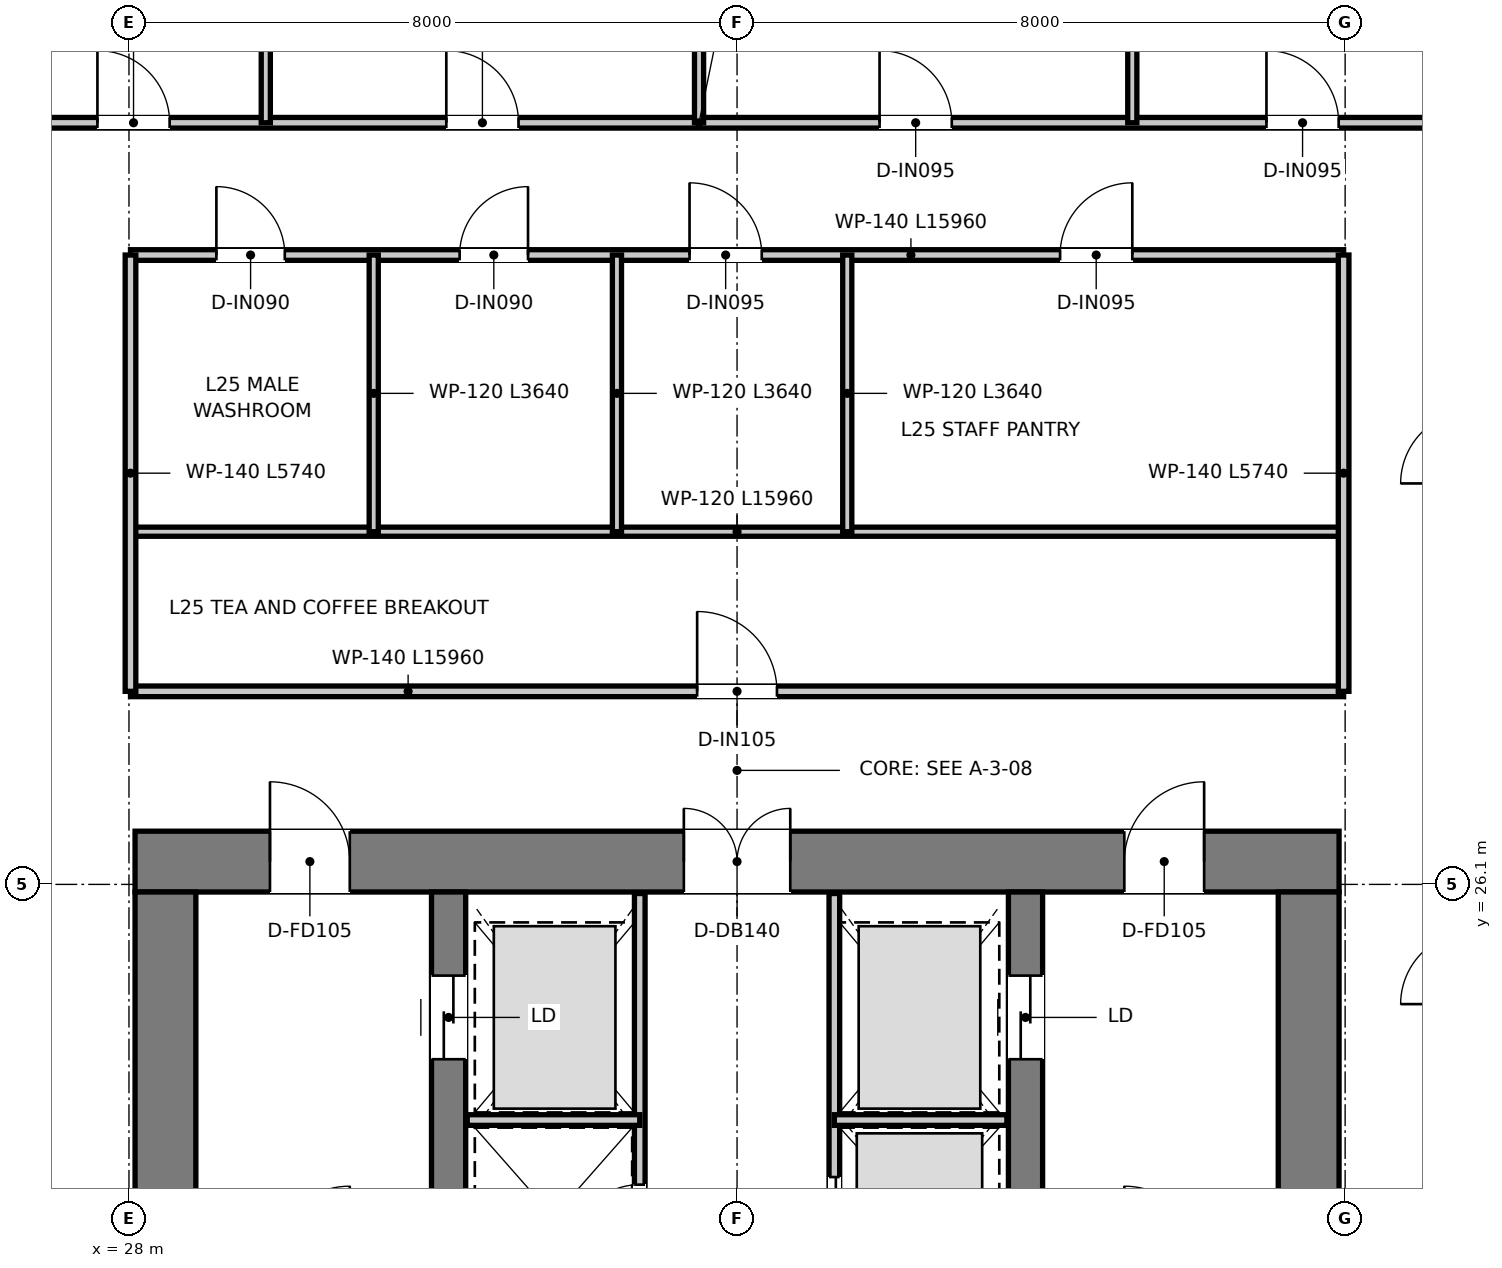
"""IFC4 building model, lengths in metres.
Left out: names, types, materials, properties, quantities, classifications, styles, units other than length and angle.
Written with IfcOpenShell. Run it as: python <this file> out.ifc"""

import sys

from ifc_helpers import new_model, si_unit, direction, frame, frame_2d, origin, place, context, subcontext, project, spatial, rectangle, extrude, element, fill, save


model = new_model("IFC4")
c1 = context("Model", 3, precision=1e-05, world=origin(), true_north=direction((0.0, 1.0)))
c2 = subcontext(c1, "Body", "Model", "MODEL_VIEW")
j1 = project(units=[si_unit("LENGTHUNIT", "METRE"), si_unit("PLANEANGLEUNIT", "RADIAN")], contexts=[c1])
p1 = place(None, origin())
s1 = spatial("IfcSite", under=j1, at=p1, CompositionType="ELEMENT")
p2 = place(p1, origin())
s2 = spatial("IfcBuilding", under=s1, at=p2, CompositionType="ELEMENT")
p3 = place(p2, frame((0.0, 0.0, 105.85)))
s3 = spatial("IfcBuildingStorey", under=s2, at=p3, CompositionType="ELEMENT", Elevation=105.85)
p4 = place(p3, frame((28.08, 26.4, 0.0), z_axis=(0.0, 0.0, 1.0), x_axis=(1.0, 0.0, 0.0)))
e1 = element("IfcWall", 1, at=p4, inside=s3, PredefinedType="SHEAR", context=c2, shape_type="SweptSolid", body=[
    extrude(rectangle(XDim=15.84, YDim=0.8, at=frame_2d((7.92, 0.0))), origin(), (0.0, 0.0, 1.0), 3.95),
])
p5 = place(p4, frame((7.22, 0.0, 0.0)))
e2 = element("IfcOpeningElement", 2, at=p5, cuts=e1, PredefinedType="OPENING", context=c2, shape_type="SweptSolid", body=[
    extrude(rectangle(XDim=1.4, YDim=2.2, at=frame_2d((0.7, 1.1))), frame((0.0, 0.41, 0.0), z_axis=(0.0, -1.0, 0.0), x_axis=(1.0, 0.0, 0.0)), (0.0, 0.0, 1.0), 0.82),
])
p6 = place(p4, frame((1.775, 0.0, 0.0)))
e3 = element("IfcOpeningElement", 3, at=p6, cuts=e1, PredefinedType="OPENING", context=c2, shape_type="SweptSolid", body=[
    extrude(rectangle(XDim=1.05, YDim=2.1, at=frame_2d((0.525, 1.05))), frame((0.0, 0.41, 0.0), z_axis=(0.0, -1.0, 0.0), x_axis=(1.0, 0.0, 0.0)), (0.0, 0.0, 1.0), 0.82),
])
p7 = place(p4, frame((13.015, 0.0, 0.0)))
e4 = element("IfcOpeningElement", 4, at=p7, cuts=e1, PredefinedType="OPENING", context=c2, shape_type="SweptSolid", body=[
    extrude(rectangle(XDim=1.05, YDim=2.1, at=frame_2d((0.525, 1.05))), frame((0.0, 0.41, 0.0), z_axis=(0.0, -1.0, 0.0), x_axis=(1.0, 0.0, 0.0)), (0.0, 0.0, 1.0), 0.82),
])
for number, where, z_axis, x_axis in (
    (5, (28.48, 11.3, 0.0), (0.0, 0.0, 1.0), (0.0, 1.0, 0.0)),
    (6, (43.52, 11.3, 0.0), (0.0, 0.0, 1.0), (0.0, 1.0, 0.0)),
):
    element("IfcWall", number, at=place(p3, frame(where, z_axis=z_axis, x_axis=x_axis)), inside=s3, PredefinedType="SHEAR", context=c2, shape_type="SweptSolid", body=[
        extrude(rectangle(XDim=14.7, YDim=0.8, at=frame_2d((7.35, 0.0))), origin(), (0.0, 0.0, 1.0), 3.95),
    ])
p8 = place(p3, frame((32.205, 13.22, 0.0), z_axis=(0.0, 0.0, 1.0), x_axis=(0.0, 1.0, 0.0)))
e7 = element("IfcWall", 7, at=p8, inside=s3, PredefinedType="SHEAR", context=c2, shape_type="SweptSolid", body=[
    extrude(rectangle(XDim=12.78, YDim=0.45, at=frame_2d((6.39, 0.0))), origin(), (0.0, 0.0, 1.0), 3.95),
])
p9 = place(p8, frame((10.58, 0.0, 0.0)))
e8 = element("IfcOpeningElement", 8, at=p9, cuts=e7, PredefinedType="OPENING", context=c2, shape_type="SweptSolid", body=[
    extrude(rectangle(XDim=1.1, YDim=2.15, at=frame_2d((0.55, 1.075))), frame((0.0, 0.235, 0.0), z_axis=(0.0, -1.0, 0.0), x_axis=(1.0, 0.0, 0.0)), (0.0, 0.0, 1.0), 0.47),
])
p10 = place(p3, frame((39.795, 13.22, 0.0), z_axis=(0.0, 0.0, 1.0), x_axis=(0.0, 1.0, 0.0)))
e9 = element("IfcWall", 9, at=p10, inside=s3, PredefinedType="SHEAR", context=c2, shape_type="SweptSolid", body=[
    extrude(rectangle(XDim=12.78, YDim=0.45, at=frame_2d((6.39, 0.0))), origin(), (0.0, 0.0, 1.0), 3.95),
])
p11 = place(p10, frame((10.58, 0.0, 0.0)))
e10 = element("IfcOpeningElement", 10, at=p11, cuts=e9, PredefinedType="OPENING", context=c2, shape_type="SweptSolid", body=[
    extrude(rectangle(XDim=1.1, YDim=2.15, at=frame_2d((0.55, 1.075))), frame((0.0, 0.235, 0.0), z_axis=(0.0, -1.0, 0.0), x_axis=(1.0, 0.0, 0.0)), (0.0, 0.0, 1.0), 0.47),
])
p12 = place(p3, frame((34.72, 20.2, 0.0), z_axis=(0.0, 0.0, 1.0), x_axis=(0.0, 1.0, 0.0)))
e11 = element("IfcWall", 11, at=p12, inside=s3, PredefinedType="PARTITIONING", context=c2, shape_type="SweptSolid", body=[
    extrude(rectangle(XDim=5.78, YDim=0.14, at=frame_2d((2.89, 0.0))), origin(), (0.0, 0.0, 1.0), 2.67),
])
p13 = place(p12, frame((1.05, 0.0, 0.0)))
e12 = element("IfcOpeningElement", 12, at=p13, cuts=e11, PredefinedType="OPENING", context=c2, shape_type="SweptSolid", body=[
    extrude(rectangle(XDim=0.9, YDim=2.1, at=frame_2d((0.45, 1.05))), frame((0.0, 0.08, 0.0), z_axis=(0.0, -1.0, 0.0), x_axis=(1.0, 0.0, 0.0)), (0.0, 0.0, 1.0), 0.16),
])
p14 = place(p3, frame((37.28, 20.2, 0.0), z_axis=(0.0, 0.0, 1.0), x_axis=(0.0, 1.0, 0.0)))
e13 = element("IfcWall", 13, at=p14, inside=s3, PredefinedType="PARTITIONING", context=c2, shape_type="SweptSolid", body=[
    extrude(rectangle(XDim=5.78, YDim=0.14, at=frame_2d((2.89, 0.0))), origin(), (0.0, 0.0, 1.0), 2.67),
])
p15 = place(p14, frame((0.95, 0.0, 0.0)))
e14 = element("IfcOpeningElement", 14, at=p15, cuts=e13, PredefinedType="OPENING", context=c2, shape_type="SweptSolid", body=[
    extrude(rectangle(XDim=1.1, YDim=2.15, at=frame_2d((0.55, 1.075))), frame((0.0, 0.08, 0.0), z_axis=(0.0, -1.0, 0.0), x_axis=(1.0, 0.0, 0.0)), (0.0, 0.0, 1.0), 0.16),
])
for number, where, z_axis, x_axis in (
    (15, (32.45, 23.0, 0.0), (0.0, 0.0, 1.0), (1.0, 0.0, 0.0)),
    (16, (37.28, 23.0, 0.0), (0.0, 0.0, 1.0), (1.0, 0.0, 0.0)),
):
    element("IfcWall", number, at=place(p3, frame(where, z_axis=z_axis, x_axis=x_axis)), inside=s3, PredefinedType="PARTITIONING", context=c2, shape_type="SweptSolid", body=[
        extrude(rectangle(XDim=2.27, YDim=0.14, at=frame_2d((1.135, 0.0))), origin(), (0.0, 0.0, 1.0), 2.67),
    ])
p16 = place(p3, frame((28.02, 28.64, 0.0), z_axis=(0.0, 0.0, 1.0), x_axis=(1.0, 0.0, 0.0)))
e17 = element("IfcWall", 17, at=p16, inside=s3, PredefinedType="PARTITIONING", context=c2, shape_type="SweptSolid", body=[
    extrude(rectangle(XDim=15.96, YDim=0.14, at=frame_2d((7.98, 0.0))), origin(), (0.0, 0.0, 1.0), 3.08),
])
p17 = place(p16, frame((7.455, 0.0, 0.0)))
e18 = element("IfcOpeningElement", 18, at=p17, cuts=e17, PredefinedType="OPENING", context=c2, shape_type="SweptSolid", body=[
    extrude(rectangle(XDim=1.05, YDim=2.15, at=frame_2d((0.525, 1.075))), frame((0.0, 0.08, 0.0), z_axis=(0.0, -1.0, 0.0), x_axis=(1.0, 0.0, 0.0)), (0.0, 0.0, 1.0), 0.16),
])
p18 = place(p3, frame((28.02, 30.74, 0.0), z_axis=(0.0, 0.0, 1.0), x_axis=(1.0, 0.0, 0.0)))
e19 = element("IfcWall", 19, at=p18, inside=s3, PredefinedType="PARTITIONING", context=c2, shape_type="SweptSolid", body=[
    extrude(rectangle(XDim=15.96, YDim=0.12, at=frame_2d((7.98, 0.0))), origin(), (0.0, 0.0, 1.0), 3.08),
])
p19 = place(p3, frame((28.02, 34.38, 0.0), z_axis=(0.0, 0.0, 1.0), x_axis=(1.0, 0.0, 0.0)))
e20 = element("IfcWall", 20, at=p19, inside=s3, PredefinedType="PARTITIONING", context=c2, shape_type="SweptSolid", body=[
    extrude(rectangle(XDim=15.96, YDim=0.14, at=frame_2d((7.98, 0.0))), origin(), (0.0, 0.0, 1.0), 3.08),
])
p20 = place(p19, frame((1.13, 0.0, 0.0)))
e21 = element("IfcOpeningElement", 21, at=p20, cuts=e20, PredefinedType="OPENING", context=c2, shape_type="SweptSolid", body=[
    extrude(rectangle(XDim=0.9, YDim=2.1, at=frame_2d((0.45, 1.05))), frame((0.0, 0.08, 0.0), z_axis=(0.0, -1.0, 0.0), x_axis=(1.0, 0.0, 0.0)), (0.0, 0.0, 1.0), 0.16),
])
p21 = place(p19, frame((4.33, 0.0, 0.0)))
e22 = element("IfcOpeningElement", 22, at=p21, cuts=e20, PredefinedType="OPENING", context=c2, shape_type="SweptSolid", body=[
    extrude(rectangle(XDim=0.9, YDim=2.1, at=frame_2d((0.45, 1.05))), frame((0.0, 0.08, 0.0), z_axis=(0.0, -1.0, 0.0), x_axis=(1.0, 0.0, 0.0)), (0.0, 0.0, 1.0), 0.16),
])
p22 = place(p19, frame((7.355, 0.0, 0.0)))
e23 = element("IfcOpeningElement", 23, at=p22, cuts=e20, PredefinedType="OPENING", context=c2, shape_type="SweptSolid", body=[
    extrude(rectangle(XDim=0.95, YDim=2.1, at=frame_2d((0.475, 1.05))), frame((0.0, 0.08, 0.0), z_axis=(0.0, -1.0, 0.0), x_axis=(1.0, 0.0, 0.0)), (0.0, 0.0, 1.0), 0.16),
])
p23 = place(p19, frame((12.23, 0.0, 0.0)))
e24 = element("IfcOpeningElement", 24, at=p23, cuts=e20, PredefinedType="OPENING", context=c2, shape_type="SweptSolid", body=[
    extrude(rectangle(XDim=0.95, YDim=2.1, at=frame_2d((0.475, 1.05))), frame((0.0, 0.08, 0.0), z_axis=(0.0, -1.0, 0.0), x_axis=(1.0, 0.0, 0.0)), (0.0, 0.0, 1.0), 0.16),
])
for number, where, z_axis, x_axis in (
    (25, (28.02, 28.64, 0.0), (0.0, 0.0, 1.0), (0.0, 1.0, 0.0)),
    (26, (43.98, 28.64, 0.0), (0.0, 0.0, 1.0), (0.0, 1.0, 0.0)),
):
    element("IfcWall", number, at=place(p3, frame(where, z_axis=z_axis, x_axis=x_axis)), inside=s3, PredefinedType="PARTITIONING", context=c2, shape_type="SweptSolid", body=[
        extrude(rectangle(XDim=5.74, YDim=0.14, at=frame_2d((2.87, 0.0))), origin(), (0.0, 0.0, 1.0), 3.27),
    ])
for number, where, z_axis, x_axis in (
    (27, (31.22, 30.74, 0.0), (0.0, 0.0, 1.0), (0.0, 1.0, 0.0)),
    (28, (34.42, 30.74, 0.0), (0.0, 0.0, 1.0), (0.0, 1.0, 0.0)),
    (29, (37.45, 30.74, 0.0), (0.0, 0.0, 1.0), (0.0, 1.0, 0.0)),
):
    element("IfcWall", number, at=place(p3, frame(where, z_axis=z_axis, x_axis=x_axis)), inside=s3, PredefinedType="PARTITIONING", context=c2, shape_type="SweptSolid", body=[
        extrude(rectangle(XDim=3.64, YDim=0.12, at=frame_2d((1.82, 0.0))), origin(), (0.0, 0.0, 1.0), 3.17),
    ])
p24 = place(p3, frame((26.32, 36.12, 0.0), z_axis=(0.0, 0.0, 1.0), x_axis=(1.0, 0.0, 0.0)))
e30 = element("IfcWall", 30, at=p24, inside=s3, PredefinedType="PARTITIONING", context=c2, shape_type="SweptSolid", body=[
    extrude(rectangle(XDim=19.36, YDim=0.14, at=frame_2d((9.68, 0.0))), origin(), (0.0, 0.0, 1.0), 3.08),
])
p25 = place(p24, frame((1.265, 0.0, 0.0)))
e31 = element("IfcOpeningElement", 31, at=p25, cuts=e30, PredefinedType="OPENING", context=c2, shape_type="SweptSolid", body=[
    extrude(rectangle(XDim=0.95, YDim=2.1, at=frame_2d((0.475, 1.05))), frame((0.0, 0.08, 0.0), z_axis=(0.0, -1.0, 0.0), x_axis=(1.0, 0.0, 0.0)), (0.0, 0.0, 1.0), 0.16),
])
p26 = place(p24, frame((5.855, 0.0, 0.0)))
e32 = element("IfcOpeningElement", 32, at=p26, cuts=e30, PredefinedType="OPENING", context=c2, shape_type="SweptSolid", body=[
    extrude(rectangle(XDim=0.95, YDim=2.1, at=frame_2d((0.475, 1.05))), frame((0.0, 0.08, 0.0), z_axis=(0.0, -1.0, 0.0), x_axis=(1.0, 0.0, 0.0)), (0.0, 0.0, 1.0), 0.16),
])
p27 = place(p24, frame((11.555, 0.0, 0.0)))
e33 = element("IfcOpeningElement", 33, at=p27, cuts=e30, PredefinedType="OPENING", context=c2, shape_type="SweptSolid", body=[
    extrude(rectangle(XDim=0.95, YDim=2.1, at=frame_2d((0.475, 1.05))), frame((0.0, 0.08, 0.0), z_axis=(0.0, -1.0, 0.0), x_axis=(1.0, 0.0, 0.0)), (0.0, 0.0, 1.0), 0.16),
])
p28 = place(p24, frame((16.645, 0.0, 0.0)))
e34 = element("IfcOpeningElement", 34, at=p28, cuts=e30, PredefinedType="OPENING", context=c2, shape_type="SweptSolid", body=[
    extrude(rectangle(XDim=0.95, YDim=2.1, at=frame_2d((0.475, 1.05))), frame((0.0, 0.08, 0.0), z_axis=(0.0, -1.0, 0.0), x_axis=(1.0, 0.0, 0.0)), (0.0, 0.0, 1.0), 0.16),
])
p29 = place(p3, frame((29.8, 36.12, 0.0), z_axis=(0.0, 0.0, 1.0), x_axis=(0.0, 1.0, 0.0)))
e35 = element("IfcWall", 35, at=p29, inside=s3, PredefinedType="PARTITIONING", context=c2, shape_type="SweptSolid", body=[
    extrude(rectangle(XDim=16.345, YDim=0.12, at=frame_2d((8.172, 0.0))), origin(), (0.0, 0.0, 1.0), 2.97),
])
p30 = place(p3, frame((35.5, 36.12, 0.0), z_axis=(0.0, 0.0, 1.0), x_axis=(0.0, 1.0, 0.0)))
e36 = element("IfcWall", 36, at=p30, inside=s3, PredefinedType="PARTITIONING", context=c2, shape_type="SweptSolid", body=[
    extrude(rectangle(XDim=14.831, YDim=0.12, at=frame_2d((7.416, 0.0))), origin(), (0.0, 0.0, 1.0), 2.97),
])
p31 = place(p3, frame((41.2, 36.12, 0.0), z_axis=(0.0, 0.0, 1.0), x_axis=(0.0, 1.0, 0.0)))
e37 = element("IfcWall", 37, at=p31, inside=s3, PredefinedType="PARTITIONING", context=c2, shape_type="SweptSolid", body=[
    extrude(rectangle(XDim=13.317, YDim=0.12, at=frame_2d((6.658, 0.0))), origin(), (0.0, 0.0, 1.0), 2.97),
])
p32 = place(p5, origin())
e38 = element("IfcDoor", 38, at=p32, inside=s3, OperationType="DOUBLE_DOOR_SINGLE_SWING", PredefinedType="DOOR", context=c2, shape_type="SweptSolid", body=[
    extrude(rectangle(XDim=1.4, YDim=2.2, at=frame_2d((0.7, 1.1))), frame((0.0, 0.025, 0.0), z_axis=(0.0, -1.0, 0.0), x_axis=(1.0, 0.0, 0.0)), (0.0, 0.0, 1.0), 0.05),
])
fill(e2, e38)
p33 = place(p6, origin())
e39 = element("IfcDoor", 39, at=p33, inside=s3, OperationType="SINGLE_SWING_LEFT", PredefinedType="DOOR", context=c2, shape_type="SweptSolid", body=[
    extrude(rectangle(XDim=1.05, YDim=2.1, at=frame_2d((0.525, 1.05))), frame((0.0, 0.025, 0.0), z_axis=(0.0, -1.0, 0.0), x_axis=(1.0, 0.0, 0.0)), (0.0, 0.0, 1.0), 0.05),
])
fill(e3, e39)
p34 = place(p7, origin())
e40 = element("IfcDoor", 40, at=p34, inside=s3, OperationType="SINGLE_SWING_RIGHT", PredefinedType="DOOR", context=c2, shape_type="SweptSolid", body=[
    extrude(rectangle(XDim=1.05, YDim=2.1, at=frame_2d((0.525, 1.05))), frame((0.0, 0.025, 0.0), z_axis=(0.0, -1.0, 0.0), x_axis=(1.0, 0.0, 0.0)), (0.0, 0.0, 1.0), 0.05),
])
fill(e4, e40)
p35 = place(p9, origin())
e41 = element("IfcDoor", 41, at=p35, inside=s3, OperationType="DOUBLE_DOOR_SLIDING", PredefinedType="DOOR", context=c2, shape_type="SweptSolid", body=[
    extrude(rectangle(XDim=1.1, YDim=2.15, at=frame_2d((0.55, 1.075))), frame((0.0, 0.025, 0.0), z_axis=(0.0, -1.0, 0.0), x_axis=(1.0, 0.0, 0.0)), (0.0, 0.0, 1.0), 0.05),
])
fill(e8, e41)
p36 = place(p11, origin())
e42 = element("IfcDoor", 42, at=p36, inside=s3, OperationType="DOUBLE_DOOR_SLIDING", PredefinedType="DOOR", context=c2, shape_type="SweptSolid", body=[
    extrude(rectangle(XDim=1.1, YDim=2.15, at=frame_2d((0.55, 1.075))), frame((0.0, 0.025, 0.0), z_axis=(0.0, -1.0, 0.0), x_axis=(1.0, 0.0, 0.0)), (0.0, 0.0, 1.0), 0.05),
])
fill(e10, e42)
p37 = place(p13, origin())
e43 = element("IfcDoor", 43, at=p37, inside=s3, OperationType="SINGLE_SWING_LEFT", PredefinedType="DOOR", context=c2, shape_type="SweptSolid", body=[
    extrude(rectangle(XDim=0.9, YDim=2.1, at=frame_2d((0.45, 1.05))), frame((0.0, 0.025, 0.0), z_axis=(0.0, -1.0, 0.0), x_axis=(1.0, 0.0, 0.0)), (0.0, 0.0, 1.0), 0.05),
])
fill(e12, e43)
p38 = place(p15, origin())
e44 = element("IfcDoor", 44, at=p38, inside=s3, OperationType="DOUBLE_DOOR_SLIDING", PredefinedType="DOOR", context=c2, shape_type="SweptSolid", body=[
    extrude(rectangle(XDim=1.1, YDim=2.15, at=frame_2d((0.55, 1.075))), frame((0.0, 0.025, 0.0), z_axis=(0.0, -1.0, 0.0), x_axis=(1.0, 0.0, 0.0)), (0.0, 0.0, 1.0), 0.05),
])
fill(e14, e44)
p39 = place(p17, origin())
e45 = element("IfcDoor", 45, at=p39, inside=s3, OperationType="SINGLE_SWING_LEFT", PredefinedType="DOOR", context=c2, shape_type="SweptSolid", body=[
    extrude(rectangle(XDim=1.05, YDim=2.15, at=frame_2d((0.525, 1.075))), frame((0.0, 0.025, 0.0), z_axis=(0.0, -1.0, 0.0), x_axis=(1.0, 0.0, 0.0)), (0.0, 0.0, 1.0), 0.05),
])
fill(e18, e45)
p40 = place(p20, origin())
e46 = element("IfcDoor", 46, at=p40, inside=s3, OperationType="SINGLE_SWING_LEFT", PredefinedType="DOOR", context=c2, shape_type="SweptSolid", body=[
    extrude(rectangle(XDim=0.9, YDim=2.1, at=frame_2d((0.45, 1.05))), frame((0.0, 0.025, 0.0), z_axis=(0.0, -1.0, 0.0), x_axis=(1.0, 0.0, 0.0)), (0.0, 0.0, 1.0), 0.05),
])
fill(e21, e46)
p41 = place(p21, origin())
e47 = element("IfcDoor", 47, at=p41, inside=s3, OperationType="SINGLE_SWING_RIGHT", PredefinedType="DOOR", context=c2, shape_type="SweptSolid", body=[
    extrude(rectangle(XDim=0.9, YDim=2.1, at=frame_2d((0.45, 1.05))), frame((0.0, 0.025, 0.0), z_axis=(0.0, -1.0, 0.0), x_axis=(1.0, 0.0, 0.0)), (0.0, 0.0, 1.0), 0.05),
])
fill(e22, e47)
p42 = place(p22, origin())
e48 = element("IfcDoor", 48, at=p42, inside=s3, OperationType="SINGLE_SWING_LEFT", PredefinedType="DOOR", context=c2, shape_type="SweptSolid", body=[
    extrude(rectangle(XDim=0.95, YDim=2.1, at=frame_2d((0.475, 1.05))), frame((0.0, 0.025, 0.0), z_axis=(0.0, -1.0, 0.0), x_axis=(1.0, 0.0, 0.0)), (0.0, 0.0, 1.0), 0.05),
])
fill(e23, e48)
p43 = place(p23, origin())
e49 = element("IfcDoor", 49, at=p43, inside=s3, OperationType="SINGLE_SWING_RIGHT", PredefinedType="DOOR", context=c2, shape_type="SweptSolid", body=[
    extrude(rectangle(XDim=0.95, YDim=2.1, at=frame_2d((0.475, 1.05))), frame((0.0, 0.025, 0.0), z_axis=(0.0, -1.0, 0.0), x_axis=(1.0, 0.0, 0.0)), (0.0, 0.0, 1.0), 0.05),
])
fill(e24, e49)
p44 = place(p25, origin())
e50 = element("IfcDoor", 50, at=p44, inside=s3, OperationType="SINGLE_SWING_LEFT", PredefinedType="DOOR", context=c2, shape_type="SweptSolid", body=[
    extrude(rectangle(XDim=0.95, YDim=2.1, at=frame_2d((0.475, 1.05))), frame((0.0, 0.025, 0.0), z_axis=(0.0, -1.0, 0.0), x_axis=(1.0, 0.0, 0.0)), (0.0, 0.0, 1.0), 0.05),
])
fill(e31, e50)
p45 = place(p26, origin())
e51 = element("IfcDoor", 51, at=p45, inside=s3, OperationType="SINGLE_SWING_LEFT", PredefinedType="DOOR", context=c2, shape_type="SweptSolid", body=[
    extrude(rectangle(XDim=0.95, YDim=2.1, at=frame_2d((0.475, 1.05))), frame((0.0, 0.025, 0.0), z_axis=(0.0, -1.0, 0.0), x_axis=(1.0, 0.0, 0.0)), (0.0, 0.0, 1.0), 0.05),
])
fill(e32, e51)
p46 = place(p27, origin())
e52 = element("IfcDoor", 52, at=p46, inside=s3, OperationType="SINGLE_SWING_LEFT", PredefinedType="DOOR", context=c2, shape_type="SweptSolid", body=[
    extrude(rectangle(XDim=0.95, YDim=2.1, at=frame_2d((0.475, 1.05))), frame((0.0, 0.025, 0.0), z_axis=(0.0, -1.0, 0.0), x_axis=(1.0, 0.0, 0.0)), (0.0, 0.0, 1.0), 0.05),
])
fill(e33, e52)
p47 = place(p28, origin())
e53 = element("IfcDoor", 53, at=p47, inside=s3, OperationType="SINGLE_SWING_LEFT", PredefinedType="DOOR", context=c2, shape_type="SweptSolid", body=[
    extrude(rectangle(XDim=0.95, YDim=2.1, at=frame_2d((0.475, 1.05))), frame((0.0, 0.025, 0.0), z_axis=(0.0, -1.0, 0.0), x_axis=(1.0, 0.0, 0.0)), (0.0, 0.0, 1.0), 0.05),
])
fill(e34, e53)
save(model, sys.argv[1])
